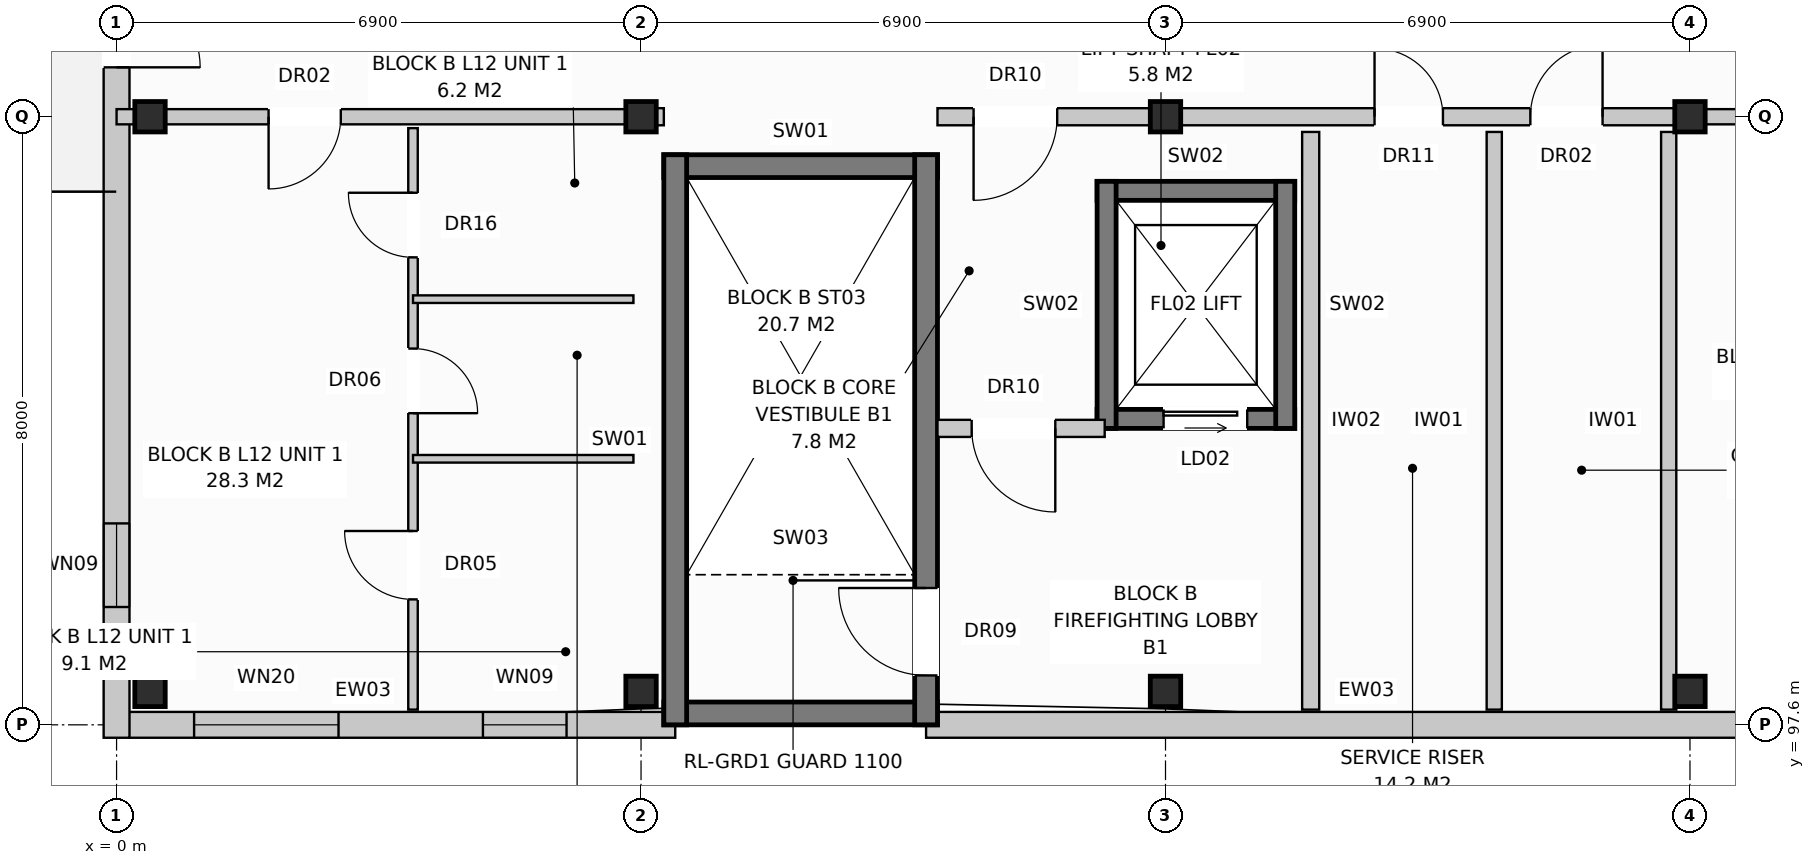
"""IFC4 building model, lengths in metres.
Left out: names, types, materials, properties, quantities, classifications, styles, units other than length and angle.
Written with IfcOpenShell. Run it as: python <this file> out.ifc"""

import sys

from ifc_helpers import new_model, si_unit, direction, frame, frame_2d, origin, origin_with_axes, origin_2d, place, context, subcontext, project, spatial, rectangle, extrude, element, fill, save


model = new_model("IFC4")
c1 = context("Model", 3, precision=1e-05, world=origin(), true_north=direction((0.0, 1.0)))
c2 = subcontext(c1, "Body", "Model", "MODEL_VIEW")
j1 = project(units=[si_unit("LENGTHUNIT", "METRE"), si_unit("PLANEANGLEUNIT", "RADIAN")], contexts=[c1])
p1 = place(None, origin())
s1 = spatial("IfcSite", under=j1, at=p1, CompositionType="ELEMENT")
p2 = place(p1, origin())
s2 = spatial("IfcBuilding", under=s1, at=p2, CompositionType="ELEMENT")
p3 = place(p2, frame((0.0, 0.0, 40.0)))
s3 = spatial("IfcBuildingStorey", under=s2, at=p3, CompositionType="ELEMENT", Elevation=40.0)
for number, where, z_axis, x_axis in (
    (1, (0.44, 98.04, 0.0), (0.0, 0.0, 1.0), (1.0, 0.0, 0.0)),
    (2, (0.44, 105.6, 0.0), (0.0, 0.0, 1.0), (1.0, 0.0, 0.0)),
    (3, (6.9, 98.04, 0.0), (0.0, 0.0, 1.0), (1.0, 0.0, 0.0)),
    (4, (6.9, 105.6, 0.0), (0.0, 0.0, 1.0), (1.0, 0.0, 0.0)),
    (5, (13.8, 98.04, 0.0), (0.0, 0.0, 1.0), (1.0, 0.0, 0.0)),
    (6, (13.8, 105.6, 0.0), (0.0, 0.0, 1.0), (1.0, 0.0, 0.0)),
    (7, (20.7, 98.04, 0.0), (0.0, 0.0, 1.0), (1.0, 0.0, 0.0)),
    (8, (20.7, 105.6, 0.0), (0.0, 0.0, 1.0), (1.0, 0.0, 0.0)),
):
    element("IfcColumn", number, at=place(p3, frame(where, z_axis=z_axis, x_axis=x_axis)), inside=s3, PredefinedType="COLUMN", context=c2, shape_type="SweptSolid", body=[
        extrude(rectangle(XDim=0.4, YDim=0.4, at=origin_2d()), origin(), (0.0, 0.0, 1.0), 3.2),
    ])
p4 = place(p3, frame((0.16, 97.6, 0.0), z_axis=(0.0, 0.0, 1.0), x_axis=(1.0, 0.0, 0.0)))
e9 = element("IfcWall", 9, at=p4, inside=s3, PredefinedType="STANDARD", context=c2, shape_type="SweptSolid", body=[
    extrude(rectangle(XDim=7.19, YDim=0.34, at=frame_2d((3.595, 0.0))), origin(), (0.0, 0.0, 1.0), 2.91),
])
p5 = place(p4, frame((0.86, 0.0, 0.8)))
e10 = element("IfcOpeningElement", 10, at=p5, cuts=e9, PredefinedType="OPENING", context=c2, shape_type="SweptSolid", body=[
    extrude(rectangle(XDim=1.9, YDim=1.85, at=frame_2d((0.95, 0.925))), frame((0.0, 0.182, 0.0), z_axis=(0.0, -1.0, 0.0), x_axis=(1.0, 0.0, 0.0)), (0.0, 0.0, 1.0), 0.364),
])
p6 = place(p4, frame((4.66, 0.0, 0.72)))
e11 = element("IfcOpeningElement", 11, at=p6, cuts=e9, PredefinedType="OPENING", context=c2, shape_type="SweptSolid", body=[
    extrude(rectangle(XDim=1.1, YDim=1.5, at=frame_2d((0.55, 0.75))), frame((0.0, 0.182, 0.0), z_axis=(0.0, -1.0, 0.0), x_axis=(1.0, 0.0, 0.0)), (0.0, 0.0, 1.0), 0.364),
])
p7 = place(p3, frame((10.65, 97.6, 0.0), z_axis=(0.0, 0.0, 1.0), x_axis=(1.0, 0.0, 0.0)))
e12 = element("IfcWall", 12, at=p7, inside=s3, PredefinedType="STANDARD", context=c2, shape_type="SweptSolid", body=[
    extrude(rectangle(XDim=17.4, YDim=0.34, at=frame_2d((8.7, 0.0))), origin(), (0.0, 0.0, 1.0), 2.91),
])
p8 = place(p7, frame((11.898, 0.0, 0.0)))
e13 = element("IfcOpeningElement", 13, at=p8, cuts=e12, PredefinedType="OPENING", context=c2, shape_type="SweptSolid", body=[
    extrude(rectangle(XDim=0.95, YDim=2.1, at=frame_2d((0.475, 1.05))), frame((0.0, 0.182, 0.0), z_axis=(0.0, -1.0, 0.0), x_axis=(1.0, 0.0, 0.0)), (0.0, 0.0, 1.0), 0.364),
])
p9 = place(p7, frame((14.97, 0.0, 0.72)))
e14 = element("IfcOpeningElement", 14, at=p9, cuts=e12, PredefinedType="OPENING", context=c2, shape_type="SweptSolid", body=[
    extrude(rectangle(XDim=1.1, YDim=1.5, at=frame_2d((0.55, 0.75))), frame((0.0, 0.182, 0.0), z_axis=(0.0, -1.0, 0.0), x_axis=(1.0, 0.0, 0.0)), (0.0, 0.0, 1.0), 0.364),
])
p10 = place(p3, frame((0.0, 97.43, 0.0), z_axis=(0.0, 0.0, 1.0), x_axis=(0.0, 1.0, 0.0)))
e15 = element("IfcWall", 15, at=p10, inside=s3, PredefinedType="STANDARD", context=c2, shape_type="SweptSolid", body=[
    extrude(rectangle(XDim=18.74, YDim=0.34, at=frame_2d((9.37, 0.0))), origin(), (0.0, 0.0, 1.0), 2.91),
])
p11 = place(p10, frame((8.82, 0.0, 0.0)))
e16 = element("IfcOpeningElement", 16, at=p11, cuts=e15, PredefinedType="OPENING", context=c2, shape_type="SweptSolid", body=[
    extrude(rectangle(XDim=1.1, YDim=2.1, at=frame_2d((0.55, 1.05))), frame((0.0, 0.182, 0.0), z_axis=(0.0, -1.0, 0.0), x_axis=(1.0, 0.0, 0.0)), (0.0, 0.0, 1.0), 0.364),
])
p12 = place(p10, frame((1.72, 0.0, 0.72)))
e17 = element("IfcOpeningElement", 17, at=p12, cuts=e15, PredefinedType="OPENING", context=c2, shape_type="SweptSolid", body=[
    extrude(rectangle(XDim=1.1, YDim=1.5, at=frame_2d((0.55, 0.75))), frame((0.0, 0.182, 0.0), z_axis=(0.0, -1.0, 0.0), x_axis=(1.0, 0.0, 0.0)), (0.0, 0.0, 1.0), 0.364),
])
p13 = place(p10, frame((15.92, 0.0, 0.72)))
e18 = element("IfcOpeningElement", 18, at=p13, cuts=e15, PredefinedType="OPENING", context=c2, shape_type="SweptSolid", body=[
    extrude(rectangle(XDim=1.1, YDim=1.5, at=frame_2d((0.55, 0.75))), frame((0.0, 0.182, 0.0), z_axis=(0.0, -1.0, 0.0), x_axis=(1.0, 0.0, 0.0)), (0.0, 0.0, 1.0), 0.364),
])
for number, where, z_axis, x_axis in (
    (19, (7.2, 97.75, 0.0), (0.0, 0.0, 1.0), (1.0, 0.0, 0.0)),
    (20, (7.2, 104.95, 0.0), (0.0, 0.0, 1.0), (1.0, 0.0, 0.0)),
):
    element("IfcWall", number, at=place(p3, frame(where, z_axis=z_axis, x_axis=x_axis)), inside=s3, PredefinedType="SHEAR", context=c2, shape_type="SweptSolid", body=[
        extrude(rectangle(XDim=3.6, YDim=0.3, at=frame_2d((1.8, 0.0))), origin(), (0.0, 0.0, 1.0), 2.97),
    ])
p14 = place(p3, frame((7.35, 97.6, 0.0), z_axis=(0.0, 0.0, 1.0), x_axis=(0.0, 1.0, 0.0)))
e21 = element("IfcWall", 21, at=p14, inside=s3, PredefinedType="SHEAR", context=c2, shape_type="SweptSolid", body=[
    extrude(rectangle(XDim=7.5, YDim=0.3, at=frame_2d((3.75, 0.0))), origin(), (0.0, 0.0, 1.0), 2.97),
])
p15 = place(p3, frame((10.65, 97.6, 0.0), z_axis=(0.0, 0.0, 1.0), x_axis=(0.0, 1.0, 0.0)))
e22 = element("IfcWall", 22, at=p15, inside=s3, PredefinedType="SHEAR", context=c2, shape_type="SweptSolid", body=[
    extrude(rectangle(XDim=7.5, YDim=0.3, at=frame_2d((3.75, 0.0))), origin(), (0.0, 0.0, 1.0), 2.97),
])
p16 = place(p15, frame((0.65, 0.0, 0.0)))
e23 = element("IfcOpeningElement", 23, at=p16, cuts=e22, PredefinedType="OPENING", context=c2, shape_type="SweptSolid", body=[
    extrude(rectangle(XDim=1.15, YDim=2.15, at=frame_2d((0.575, 1.075))), frame((0.0, 0.162, 0.0), z_axis=(0.0, -1.0, 0.0), x_axis=(1.0, 0.0, 0.0)), (0.0, 0.0, 1.0), 0.324),
])
p17 = place(p3, frame((12.9, 101.625, 0.0), z_axis=(0.0, 0.0, 1.0), x_axis=(1.0, 0.0, 0.0)))
e24 = element("IfcWall", 24, at=p17, inside=s3, PredefinedType="SHEAR", context=c2, shape_type="SweptSolid", body=[
    extrude(rectangle(XDim=2.6, YDim=0.25, at=frame_2d((1.3, 0.0))), origin(), (0.0, 0.0, 1.0), 2.97),
])
p18 = place(p17, frame((0.875, 0.0, 0.0)))
e25 = element("IfcOpeningElement", 25, at=p18, cuts=e24, PredefinedType="OPENING", context=c2, shape_type="SweptSolid", body=[
    extrude(rectangle(XDim=1.1, YDim=2.1, at=frame_2d((0.55, 1.05))), frame((0.0, 0.137, 0.0), z_axis=(0.0, -1.0, 0.0), x_axis=(1.0, 0.0, 0.0)), (0.0, 0.0, 1.0), 0.274),
])
p19 = place(p3, frame((12.9, 104.625, 0.0), z_axis=(0.0, 0.0, 1.0), x_axis=(1.0, 0.0, 0.0)))
e26 = element("IfcWall", 26, at=p19, inside=s3, PredefinedType="SHEAR", context=c2, shape_type="SweptSolid", body=[
    extrude(rectangle(XDim=2.6, YDim=0.25, at=frame_2d((1.3, 0.0))), origin(), (0.0, 0.0, 1.0), 2.97),
])
for number, where, z_axis, x_axis in (
    (27, (13.025, 101.5, 0.0), (0.0, 0.0, 1.0), (0.0, 1.0, 0.0)),
    (28, (15.375, 101.5, 0.0), (0.0, 0.0, 1.0), (0.0, 1.0, 0.0)),
):
    element("IfcWall", number, at=place(p3, frame(where, z_axis=z_axis, x_axis=x_axis)), inside=s3, PredefinedType="SHEAR", context=c2, shape_type="SweptSolid", body=[
        extrude(rectangle(XDim=3.25, YDim=0.25, at=frame_2d((1.625, 0.0))), origin(), (0.0, 0.0, 1.0), 2.97),
    ])
p20 = place(p3, frame((15.71, 97.8, 0.0), z_axis=(0.0, 0.0, 1.0), x_axis=(0.0, 1.0, 0.0)))
e29 = element("IfcWall", 29, at=p20, inside=s3, PredefinedType="PARTITIONING", context=c2, shape_type="SweptSolid", body=[
    extrude(rectangle(XDim=7.6, YDim=0.225, at=frame_2d((3.8, 0.0))), origin(), (0.0, 0.0, 1.0), 2.59),
])
p21 = place(p3, frame((10.8, 101.5, 0.0), z_axis=(0.0, 0.0, 1.0), x_axis=(1.0, 0.0, 0.0)))
e30 = element("IfcWall", 30, at=p21, inside=s3, PredefinedType="PARTITIONING", context=c2, shape_type="SweptSolid", body=[
    extrude(rectangle(XDim=2.2, YDim=0.225, at=frame_2d((1.1, 0.0))), origin(), (0.0, 0.0, 1.0), 2.97),
])
p22 = place(p21, frame((0.45, 0.0, 0.0)))
e31 = element("IfcOpeningElement", 31, at=p22, cuts=e30, PredefinedType="OPENING", context=c2, shape_type="SweptSolid", body=[
    extrude(rectangle(XDim=1.1, YDim=2.15, at=frame_2d((0.55, 1.075))), frame((0.0, 0.125, 0.0), z_axis=(0.0, -1.0, 0.0), x_axis=(1.0, 0.0, 0.0)), (0.0, 0.0, 1.0), 0.249),
])
p23 = place(p3, frame((6.9, 105.6, 0.0), z_axis=(0.0, 0.0, 1.0), x_axis=(1.0, 0.0, 0.0)))
e32 = element("IfcWall", 32, at=p23, inside=s3, PredefinedType="PARTITIONING", context=c2, shape_type="SweptSolid", body=[
    extrude(rectangle(XDim=0.3, YDim=0.225, at=frame_2d((0.15, 0.0))), origin(), (0.0, 0.0, 1.0), 2.97),
])
for number, where, z_axis, x_axis in (
    (33, (18.125, 97.8, 0.0), (0.0, 0.0, 1.0), (0.0, 1.0, 0.0)),
    (34, (20.42, 97.8, 0.0), (0.0, 0.0, 1.0), (0.0, 1.0, 0.0)),
):
    element("IfcWall", number, at=place(p3, frame(where, z_axis=z_axis, x_axis=x_axis)), inside=s3, PredefinedType="PARTITIONING", context=c2, shape_type="SweptSolid", body=[
        extrude(rectangle(XDim=7.6, YDim=0.2, at=frame_2d((3.8, 0.0))), origin(), (0.0, 0.0, 1.0), 2.97),
    ])
p24 = place(p3, frame((10.8, 105.6, 0.0), z_axis=(0.0, 0.0, 1.0), x_axis=(1.0, 0.0, 0.0)))
e35 = element("IfcWall", 35, at=p24, inside=s3, PredefinedType="PARTITIONING", context=c2, shape_type="SweptSolid", body=[
    extrude(rectangle(XDim=9.9, YDim=0.225, at=frame_2d((4.95, 0.0))), origin(), (0.0, 0.0, 1.0), 2.35),
])
p25 = place(p24, frame((0.475, 0.0, 0.0)))
e36 = element("IfcOpeningElement", 36, at=p25, cuts=e35, PredefinedType="OPENING", context=c2, shape_type="SweptSolid", body=[
    extrude(rectangle(XDim=1.1, YDim=2.15, at=frame_2d((0.55, 1.075))), frame((0.0, 0.125, 0.0), z_axis=(0.0, -1.0, 0.0), x_axis=(1.0, 0.0, 0.0)), (0.0, 0.0, 1.0), 0.249),
])
p26 = place(p24, frame((5.75, 0.0, 0.0)))
e37 = element("IfcOpeningElement", 37, at=p26, cuts=e35, PredefinedType="OPENING", context=c2, shape_type="SweptSolid", body=[
    extrude(rectangle(XDim=0.9, YDim=2.1, at=frame_2d((0.45, 1.05))), frame((0.0, 0.125, 0.0), z_axis=(0.0, -1.0, 0.0), x_axis=(1.0, 0.0, 0.0)), (0.0, 0.0, 1.0), 0.249),
])
p27 = place(p24, frame((7.8, 0.0, 0.0)))
e38 = element("IfcOpeningElement", 38, at=p27, cuts=e35, PredefinedType="OPENING", context=c2, shape_type="SweptSolid", body=[
    extrude(rectangle(XDim=0.95, YDim=2.15, at=frame_2d((0.475, 1.075))), frame((0.0, 0.125, 0.0), z_axis=(0.0, -1.0, 0.0), x_axis=(1.0, 0.0, 0.0)), (0.0, 0.0, 1.0), 0.249),
])
p28 = place(p3, frame((0.0, 105.6, 0.0), z_axis=(0.0, 0.0, 1.0), x_axis=(1.0, 0.0, 0.0)))
e39 = element("IfcWall", 39, at=p28, inside=s3, PredefinedType="PARTITIONING", context=c2, shape_type="SweptSolid", body=[
    extrude(rectangle(XDim=6.9, YDim=0.2, at=frame_2d((3.45, 0.0))), origin(), (0.0, 0.0, 1.0), 2.35),
])
p29 = place(p28, frame((2.0, 0.0, 0.0)))
e40 = element("IfcOpeningElement", 40, at=p29, cuts=e39, PredefinedType="OPENING", context=c2, shape_type="SweptSolid", body=[
    extrude(rectangle(XDim=0.95, YDim=2.15, at=frame_2d((0.475, 1.075))), frame((0.0, 0.112, 0.0), z_axis=(0.0, -1.0, 0.0), x_axis=(1.0, 0.0, 0.0)), (0.0, 0.0, 1.0), 0.224),
])
p30 = place(p3, frame((3.9, 105.45, 0.0), z_axis=(0.0, 0.0, 1.0), x_axis=(0.0, -1.0, 0.0)))
e41 = element("IfcWall", 41, at=p30, inside=s3, PredefinedType="PARTITIONING", context=c2, shape_type="SweptSolid", body=[
    extrude(rectangle(XDim=7.65, YDim=0.125, at=frame_2d((3.825, 0.0))), origin(), (0.0, 0.0, 1.0), 2.97),
])
p31 = place(p30, frame((0.85, 0.0, 0.0)))
e42 = element("IfcOpeningElement", 42, at=p31, cuts=e41, PredefinedType="OPENING", context=c2, shape_type="SweptSolid", body=[
    extrude(rectangle(XDim=0.85, YDim=2.1, at=frame_2d((0.425, 1.05))), frame((0.0, 0.074, 0.0), z_axis=(0.0, -1.0, 0.0), x_axis=(1.0, 0.0, 0.0)), (0.0, 0.0, 1.0), 0.149),
])
p32 = place(p30, frame((2.9, 0.0, 0.0)))
e43 = element("IfcOpeningElement", 43, at=p32, cuts=e41, PredefinedType="OPENING", context=c2, shape_type="SweptSolid", body=[
    extrude(rectangle(XDim=0.85, YDim=2.05, at=frame_2d((0.425, 1.025))), frame((0.0, 0.074, 0.0), z_axis=(0.0, -1.0, 0.0), x_axis=(1.0, 0.0, 0.0)), (0.0, 0.0, 1.0), 0.149),
])
p33 = place(p30, frame((5.3, 0.0, 0.0)))
e44 = element("IfcOpeningElement", 44, at=p33, cuts=e41, PredefinedType="OPENING", context=c2, shape_type="SweptSolid", body=[
    extrude(rectangle(XDim=0.9, YDim=2.1, at=frame_2d((0.45, 1.05))), frame((0.0, 0.074, 0.0), z_axis=(0.0, -1.0, 0.0), x_axis=(1.0, 0.0, 0.0)), (0.0, 0.0, 1.0), 0.149),
])
for number, where, z_axis, x_axis in (
    (45, (3.9, 103.2, 0.0), (0.0, 0.0, 1.0), (1.0, 0.0, 0.0)),
    (46, (3.9, 101.1, 0.0), (0.0, 0.0, 1.0), (1.0, 0.0, 0.0)),
):
    element("IfcWall", number, at=place(p3, frame(where, z_axis=z_axis, x_axis=x_axis)), inside=s3, PredefinedType="PARTITIONING", context=c2, shape_type="SweptSolid", body=[
        extrude(rectangle(XDim=2.9, YDim=0.1, at=frame_2d((1.45, 0.0))), origin(), (0.0, 0.0, 1.0), 2.97),
    ])
p34 = place(p3, frame((20.7, 105.6, 0.0), z_axis=(0.0, 0.0, 1.0), x_axis=(1.0, 0.0, 0.0)))
e47 = element("IfcWall", 47, at=p34, inside=s3, PredefinedType="PARTITIONING", context=c2, shape_type="SweptSolid", body=[
    extrude(rectangle(XDim=6.9, YDim=0.2, at=frame_2d((3.45, 0.0))), origin(), (0.0, 0.0, 1.0), 2.35),
])
p35 = place(p34, frame((2.0, 0.0, 0.0)))
e48 = element("IfcOpeningElement", 48, at=p35, cuts=e47, PredefinedType="OPENING", context=c2, shape_type="SweptSolid", body=[
    extrude(rectangle(XDim=0.95, YDim=2.15, at=frame_2d((0.475, 1.075))), frame((0.0, 0.112, 0.0), z_axis=(0.0, -1.0, 0.0), x_axis=(1.0, 0.0, 0.0)), (0.0, 0.0, 1.0), 0.224),
])
p36 = place(p5, origin_with_axes())
e49 = element("IfcWindow", 49, at=p36, inside=s3, PartitioningType="SINGLE_PANEL", PredefinedType="WINDOW", context=c2, shape_type="SweptSolid", body=[
    extrude(rectangle(XDim=1.9, YDim=1.85, at=frame_2d((0.95, 0.925))), frame((0.0, 0.03, 0.0), z_axis=(0.0, -1.0, 0.0), x_axis=(1.0, 0.0, 0.0)), (0.0, 0.0, 1.0), 0.06),
])
fill(e10, e49)
p37 = place(p6, origin_with_axes())
e50 = element("IfcWindow", 50, at=p37, inside=s3, PartitioningType="SINGLE_PANEL", PredefinedType="WINDOW", context=c2, shape_type="SweptSolid", body=[
    extrude(rectangle(XDim=1.1, YDim=1.5, at=frame_2d((0.55, 0.75))), frame((0.0, 0.03, 0.0), z_axis=(0.0, -1.0, 0.0), x_axis=(1.0, 0.0, 0.0)), (0.0, 0.0, 1.0), 0.06),
])
fill(e11, e50)
p38 = place(p11, frame((1.1, 0.0, 0.0), z_axis=(0.0, 0.0, 1.0), x_axis=(-1.0, 0.0, 0.0)))
e51 = element("IfcDoor", 51, at=p38, inside=s3, OperationType="SINGLE_SWING_LEFT", PredefinedType="DOOR", context=c2, shape_type="SweptSolid", body=[
    extrude(rectangle(XDim=1.1, YDim=2.1, at=frame_2d((0.55, 1.05))), frame((0.0, 0.025, 0.0), z_axis=(0.0, -1.0, 0.0), x_axis=(1.0, 0.0, 0.0)), (0.0, 0.0, 1.0), 0.05),
])
fill(e16, e51)
p39 = place(p12, origin_with_axes())
e52 = element("IfcWindow", 52, at=p39, inside=s3, PartitioningType="SINGLE_PANEL", PredefinedType="WINDOW", context=c2, shape_type="SweptSolid", body=[
    extrude(rectangle(XDim=1.1, YDim=1.5, at=frame_2d((0.55, 0.75))), frame((0.0, 0.03, 0.0), z_axis=(0.0, -1.0, 0.0), x_axis=(1.0, 0.0, 0.0)), (0.0, 0.0, 1.0), 0.06),
])
fill(e17, e52)
p40 = place(p16, origin_with_axes())
e53 = element("IfcDoor", 53, at=p40, inside=s3, OperationType="SINGLE_SWING_RIGHT", PredefinedType="DOOR", context=c2, shape_type="SweptSolid", body=[
    extrude(rectangle(XDim=1.15, YDim=2.15, at=frame_2d((0.575, 1.075))), frame((0.0, 0.025, 0.0), z_axis=(0.0, -1.0, 0.0), x_axis=(1.0, 0.0, 0.0)), (0.0, 0.0, 1.0), 0.05),
])
fill(e23, e53)
p41 = place(p18, origin_with_axes())
e54 = element("IfcDoor", 54, at=p41, inside=s3, OperationType="SLIDING_TO_LEFT", PredefinedType="DOOR", context=c2, shape_type="SweptSolid", body=[
    extrude(rectangle(XDim=1.1, YDim=2.1, at=frame_2d((0.55, 1.05))), frame((0.0, 0.025, 0.0), z_axis=(0.0, -1.0, 0.0), x_axis=(1.0, 0.0, 0.0)), (0.0, 0.0, 1.0), 0.05),
])
fill(e25, e54)
p42 = place(p22, frame((1.1, 0.0, 0.0), z_axis=(0.0, 0.0, 1.0), x_axis=(-1.0, 0.0, 0.0)))
e55 = element("IfcDoor", 55, at=p42, inside=s3, OperationType="SINGLE_SWING_RIGHT", PredefinedType="DOOR", context=c2, shape_type="SweptSolid", body=[
    extrude(rectangle(XDim=1.1, YDim=2.15, at=frame_2d((0.55, 1.075))), frame((0.0, 0.025, 0.0), z_axis=(0.0, -1.0, 0.0), x_axis=(1.0, 0.0, 0.0)), (0.0, 0.0, 1.0), 0.05),
])
fill(e31, e55)
p43 = place(p25, frame((1.1, 0.0, 0.0), z_axis=(0.0, 0.0, 1.0), x_axis=(-1.0, 0.0, 0.0)))
e56 = element("IfcDoor", 56, at=p43, inside=s3, OperationType="SINGLE_SWING_LEFT", PredefinedType="DOOR", context=c2, shape_type="SweptSolid", body=[
    extrude(rectangle(XDim=1.1, YDim=2.15, at=frame_2d((0.55, 1.075))), frame((0.0, 0.025, 0.0), z_axis=(0.0, -1.0, 0.0), x_axis=(1.0, 0.0, 0.0)), (0.0, 0.0, 1.0), 0.05),
])
fill(e36, e56)
p44 = place(p26, origin_with_axes())
e57 = element("IfcDoor", 57, at=p44, inside=s3, OperationType="SINGLE_SWING_LEFT", PredefinedType="DOOR", context=c2, shape_type="SweptSolid", body=[
    extrude(rectangle(XDim=0.9, YDim=2.1, at=frame_2d((0.45, 1.05))), frame((0.0, 0.025, 0.0), z_axis=(0.0, -1.0, 0.0), x_axis=(1.0, 0.0, 0.0)), (0.0, 0.0, 1.0), 0.05),
])
fill(e37, e57)
p45 = place(p27, origin_with_axes())
e58 = element("IfcDoor", 58, at=p45, inside=s3, OperationType="SINGLE_SWING_RIGHT", PredefinedType="DOOR", context=c2, shape_type="SweptSolid", body=[
    extrude(rectangle(XDim=0.95, YDim=2.15, at=frame_2d((0.475, 1.075))), frame((0.0, 0.025, 0.0), z_axis=(0.0, -1.0, 0.0), x_axis=(1.0, 0.0, 0.0)), (0.0, 0.0, 1.0), 0.05),
])
fill(e38, e58)
p46 = place(p29, frame((0.95, 0.0, 0.0), z_axis=(0.0, 0.0, 1.0), x_axis=(-1.0, 0.0, 0.0)))
e59 = element("IfcDoor", 59, at=p46, inside=s3, OperationType="SINGLE_SWING_LEFT", PredefinedType="DOOR", context=c2, shape_type="SweptSolid", body=[
    extrude(rectangle(XDim=0.95, YDim=2.15, at=frame_2d((0.475, 1.075))), frame((0.0, 0.025, 0.0), z_axis=(0.0, -1.0, 0.0), x_axis=(1.0, 0.0, 0.0)), (0.0, 0.0, 1.0), 0.05),
])
fill(e40, e59)
p47 = place(p31, frame((0.85, 0.0, 0.0), z_axis=(0.0, 0.0, 1.0), x_axis=(-1.0, 0.0, 0.0)))
e60 = element("IfcDoor", 60, at=p47, inside=s3, OperationType="SINGLE_SWING_LEFT", PredefinedType="DOOR", context=c2, shape_type="SweptSolid", body=[
    extrude(rectangle(XDim=0.85, YDim=2.1, at=frame_2d((0.425, 1.05))), frame((0.0, 0.025, 0.0), z_axis=(0.0, -1.0, 0.0), x_axis=(1.0, 0.0, 0.0)), (0.0, 0.0, 1.0), 0.05),
])
fill(e42, e60)
p48 = place(p32, origin_with_axes())
e61 = element("IfcDoor", 61, at=p48, inside=s3, OperationType="SINGLE_SWING_RIGHT", PredefinedType="DOOR", context=c2, shape_type="SweptSolid", body=[
    extrude(rectangle(XDim=0.85, YDim=2.05, at=frame_2d((0.425, 1.025))), frame((0.0, 0.025, 0.0), z_axis=(0.0, -1.0, 0.0), x_axis=(1.0, 0.0, 0.0)), (0.0, 0.0, 1.0), 0.05),
])
fill(e43, e61)
p49 = place(p33, frame((0.9, 0.0, 0.0), z_axis=(0.0, 0.0, 1.0), x_axis=(-1.0, 0.0, 0.0)))
e62 = element("IfcDoor", 62, at=p49, inside=s3, OperationType="SINGLE_SWING_LEFT", PredefinedType="DOOR", context=c2, shape_type="SweptSolid", body=[
    extrude(rectangle(XDim=0.9, YDim=2.1, at=frame_2d((0.45, 1.05))), frame((0.0, 0.025, 0.0), z_axis=(0.0, -1.0, 0.0), x_axis=(1.0, 0.0, 0.0)), (0.0, 0.0, 1.0), 0.05),
])
fill(e44, e62)
save(model, sys.argv[1])
